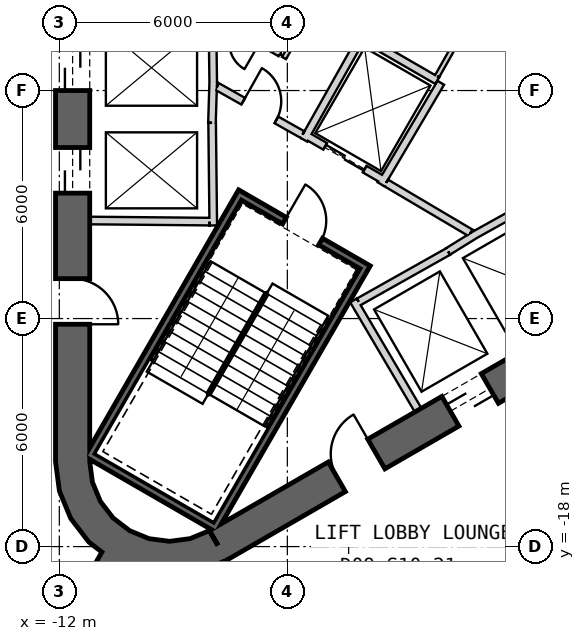
"""IFC4 building model, lengths in metres.
Left out: names, types, materials, properties, quantities, classifications, styles, units other than length and angle.
Written with IfcOpenShell. Run it as: python <this file> out.ifc"""

import sys

from ifc_helpers import new_model, si_unit, direction, frame, frame_2d, origin, place, context, subcontext, project, spatial, polyline, rectangle, outline, extrude, element, fill, save


model = new_model("IFC4")
c1 = context("Model", 3, precision=1e-05, world=origin(), true_north=direction((0.0, 1.0)))
c2 = subcontext(c1, "Body", "Model", "MODEL_VIEW")
j1 = project(units=[si_unit("LENGTHUNIT", "METRE"), si_unit("PLANEANGLEUNIT", "RADIAN")], contexts=[c1])
p1 = place(None, origin())
s1 = spatial("IfcSite", under=j1, at=p1, CompositionType="ELEMENT")
p2 = place(p1, origin())
s2 = spatial("IfcBuilding", under=s1, at=p2, CompositionType="ELEMENT")
p3 = place(p2, frame((0.0, 0.0, 181.2)))
s3 = spatial("IfcBuildingStorey", under=s2, at=p3, CompositionType="ELEMENT", Elevation=181.2)
p4 = place(p3, frame((-11.65, 15.762, 0.0), z_axis=(0.0, 0.0, 1.0), x_axis=(0.0, -1.0, 0.0)))
e1 = element("IfcWall", 1, at=p4, inside=s3, PredefinedType="SHEAR", context=c2, shape_type="SweptSolid", body=[
    extrude(rectangle(XDim=31.523, YDim=0.9, at=frame_2d((15.762, 0.0))), origin(), (0.0, 0.0, 1.0), 4.0),
])
p5 = place(p4, frame((7.062, 0.0, 0.0)))
e2 = element("IfcOpeningElement", 2, at=p5, cuts=e1, PredefinedType="OPENING", context=c2, shape_type="SweptSolid", body=[
    extrude(rectangle(XDim=1.2, YDim=2.4, at=frame_2d((0.6, 1.2))), frame((0.0, 0.46, 0.0), z_axis=(0.0, -1.0, 0.0), x_axis=(1.0, 0.0, 0.0)), (0.0, 0.0, 1.0), 0.92),
])
p6 = place(p4, frame((9.762, 0.0, 0.0)))
e3 = element("IfcOpeningElement", 3, at=p6, cuts=e1, PredefinedType="OPENING", context=c2, shape_type="SweptSolid", body=[
    extrude(rectangle(XDim=1.2, YDim=2.4, at=frame_2d((0.6, 1.2))), frame((0.0, 0.46, 0.0), z_axis=(0.0, -1.0, 0.0), x_axis=(1.0, 0.0, 0.0)), (0.0, 0.0, 1.0), 0.92),
])
p7 = place(p4, frame((12.462, 0.0, 0.0)))
e4 = element("IfcOpeningElement", 4, at=p7, cuts=e1, PredefinedType="OPENING", context=c2, shape_type="SweptSolid", body=[
    extrude(rectangle(XDim=1.2, YDim=2.4, at=frame_2d((0.6, 1.2))), frame((0.0, 0.46, 0.0), z_axis=(0.0, -1.0, 0.0), x_axis=(1.0, 0.0, 0.0)), (0.0, 0.0, 1.0), 0.92),
])
p8 = place(p4, frame((15.162, 0.0, 0.0)))
e5 = element("IfcOpeningElement", 5, at=p8, cuts=e1, PredefinedType="OPENING", context=c2, shape_type="SweptSolid", body=[
    extrude(rectangle(XDim=1.2, YDim=2.4, at=frame_2d((0.6, 1.2))), frame((0.0, 0.46, 0.0), z_axis=(0.0, -1.0, 0.0), x_axis=(1.0, 0.0, 0.0)), (0.0, 0.0, 1.0), 0.92),
])
p9 = place(p4, frame((17.862, 0.0, 0.0)))
e6 = element("IfcOpeningElement", 6, at=p9, cuts=e1, PredefinedType="OPENING", context=c2, shape_type="SweptSolid", body=[
    extrude(rectangle(XDim=1.2, YDim=2.4, at=frame_2d((0.6, 1.2))), frame((0.0, 0.46, 0.0), z_axis=(0.0, -1.0, 0.0), x_axis=(1.0, 0.0, 0.0)), (0.0, 0.0, 1.0), 0.92),
])
p10 = place(p4, frame((20.562, 0.0, 0.0)))
e7 = element("IfcOpeningElement", 7, at=p10, cuts=e1, PredefinedType="OPENING", context=c2, shape_type="SweptSolid", body=[
    extrude(rectangle(XDim=1.2, YDim=2.4, at=frame_2d((0.6, 1.2))), frame((0.0, 0.46, 0.0), z_axis=(0.0, -1.0, 0.0), x_axis=(1.0, 0.0, 0.0)), (0.0, 0.0, 1.0), 0.92),
])
p11 = place(p4, frame((23.262, 0.0, 0.0)))
e8 = element("IfcOpeningElement", 8, at=p11, cuts=e1, PredefinedType="OPENING", context=c2, shape_type="SweptSolid", body=[
    extrude(rectangle(XDim=1.2, YDim=2.4, at=frame_2d((0.6, 1.2))), frame((0.0, 0.46, 0.0), z_axis=(0.0, -1.0, 0.0), x_axis=(1.0, 0.0, 0.0)), (0.0, 0.0, 1.0), 0.92),
])
p12 = place(p4, frame((3.612, 0.0, 0.0)))
e9 = element("IfcOpeningElement", 9, at=p12, cuts=e1, PredefinedType="OPENING", context=c2, shape_type="SweptSolid", body=[
    extrude(rectangle(XDim=1.2, YDim=2.4, at=frame_2d((0.6, 1.2))), frame((0.0, 0.46, 0.0), z_axis=(0.0, -1.0, 0.0), x_axis=(1.0, 0.0, 0.0)), (0.0, 0.0, 1.0), 0.92),
])
p13 = place(p4, frame((26.712, 0.0, 0.0)))
e10 = element("IfcOpeningElement", 10, at=p13, cuts=e1, PredefinedType="OPENING", context=c2, shape_type="SweptSolid", body=[
    extrude(rectangle(XDim=1.2, YDim=2.4, at=frame_2d((0.6, 1.2))), frame((0.0, 0.46, 0.0), z_axis=(0.0, -1.0, 0.0), x_axis=(1.0, 0.0, 0.0)), (0.0, 0.0, 1.0), 0.92),
])
p14 = place(p3, frame((-7.825, -17.97, 0.0), z_axis=(0.0, 0.0, 1.0), x_axis=(0.866028369851, 0.499994862586, 0.0)))
e11 = element("IfcWall", 11, at=p14, inside=s3, PredefinedType="SHEAR", context=c2, shape_type="SweptSolid", body=[
    extrude(rectangle(XDim=31.523, YDim=0.9, at=frame_2d((15.762, 0.0))), origin(), (0.0, 0.0, 1.0), 4.0),
])
p15 = place(p14, frame((7.062, 0.0, 0.0)))
e12 = element("IfcOpeningElement", 12, at=p15, cuts=e11, PredefinedType="OPENING", context=c2, shape_type="SweptSolid", body=[
    extrude(rectangle(XDim=1.2, YDim=2.4, at=frame_2d((0.6, 1.2))), frame((0.0, 0.46, 0.0), z_axis=(0.0, -1.0, 0.0), x_axis=(1.0, 0.0, 0.0)), (0.0, 0.0, 1.0), 0.92),
])
p16 = place(p14, frame((9.762, 0.0, 0.0)))
e13 = element("IfcOpeningElement", 13, at=p16, cuts=e11, PredefinedType="OPENING", context=c2, shape_type="SweptSolid", body=[
    extrude(rectangle(XDim=1.2, YDim=2.4, at=frame_2d((0.6, 1.2))), frame((0.0, 0.46, 0.0), z_axis=(0.0, -1.0, 0.0), x_axis=(1.0, 0.0, 0.0)), (0.0, 0.0, 1.0), 0.92),
])
p17 = place(p14, frame((12.462, 0.0, 0.0)))
e14 = element("IfcOpeningElement", 14, at=p17, cuts=e11, PredefinedType="OPENING", context=c2, shape_type="SweptSolid", body=[
    extrude(rectangle(XDim=1.2, YDim=2.4, at=frame_2d((0.6, 1.2))), frame((0.0, 0.46, 0.0), z_axis=(0.0, -1.0, 0.0), x_axis=(1.0, 0.0, 0.0)), (0.0, 0.0, 1.0), 0.92),
])
p18 = place(p14, frame((15.162, 0.0, 0.0)))
e15 = element("IfcOpeningElement", 15, at=p18, cuts=e11, PredefinedType="OPENING", context=c2, shape_type="SweptSolid", body=[
    extrude(rectangle(XDim=1.2, YDim=2.4, at=frame_2d((0.6, 1.2))), frame((0.0, 0.46, 0.0), z_axis=(0.0, -1.0, 0.0), x_axis=(1.0, 0.0, 0.0)), (0.0, 0.0, 1.0), 0.92),
])
p19 = place(p14, frame((17.862, 0.0, 0.0)))
e16 = element("IfcOpeningElement", 16, at=p19, cuts=e11, PredefinedType="OPENING", context=c2, shape_type="SweptSolid", body=[
    extrude(rectangle(XDim=1.2, YDim=2.4, at=frame_2d((0.6, 1.2))), frame((0.0, 0.46, 0.0), z_axis=(0.0, -1.0, 0.0), x_axis=(1.0, 0.0, 0.0)), (0.0, 0.0, 1.0), 0.92),
])
p20 = place(p14, frame((20.562, 0.0, 0.0)))
e17 = element("IfcOpeningElement", 17, at=p20, cuts=e11, PredefinedType="OPENING", context=c2, shape_type="SweptSolid", body=[
    extrude(rectangle(XDim=1.2, YDim=2.4, at=frame_2d((0.6, 1.2))), frame((0.0, 0.46, 0.0), z_axis=(0.0, -1.0, 0.0), x_axis=(1.0, 0.0, 0.0)), (0.0, 0.0, 1.0), 0.92),
])
p21 = place(p14, frame((26.712, 0.0, 0.0)))
e18 = element("IfcOpeningElement", 18, at=p21, cuts=e11, PredefinedType="OPENING", context=c2, shape_type="SweptSolid", body=[
    extrude(rectangle(XDim=1.2, YDim=2.4, at=frame_2d((0.6, 1.2))), frame((0.0, 0.46, 0.0), z_axis=(0.0, -1.0, 0.0), x_axis=(1.0, 0.0, 0.0)), (0.0, 0.0, 1.0), 0.92),
])
p22 = place(p14, frame((3.612, 0.0, 0.0)))
e19 = element("IfcOpeningElement", 19, at=p22, cuts=e11, PredefinedType="OPENING", context=c2, shape_type="SweptSolid", body=[
    extrude(rectangle(XDim=1.2, YDim=2.4, at=frame_2d((0.6, 1.2))), frame((0.0, 0.46, 0.0), z_axis=(0.0, -1.0, 0.0), x_axis=(1.0, 0.0, 0.0)), (0.0, 0.0, 1.0), 0.92),
])
p23 = place(p3, origin())
e20 = element("IfcWall", 20, at=p23, inside=s3, PredefinedType="SHEAR", context=c2, shape_type="SweptSolid", body=[
    extrude(outline(polyline([(-12.1, -15.762), (-11.998, -16.538), (-11.698, -17.262), (-11.221, -17.883), (-10.6, -18.36), (-9.876, -18.659), (-9.1, -18.762), (-8.323, -18.659), (-7.6, -18.36), (-8.05, -17.58), (-8.556, -17.79), (-9.1, -17.862), (-9.644, -17.79), (-10.15, -17.58), (-10.585, -17.247), (-10.919, -16.812), (-11.128, -16.305), (-11.2, -15.762), (-12.1, -15.762)])), origin(), (0.0, 0.0, 1.0), 4.0),
])
p24 = place(p3, frame((-10.575, -18.316, 0.0), z_axis=(0.0, 0.0, 1.0), x_axis=(-0.500002625756, -0.866023887798, 0.0)))
e21 = element("IfcWall", 21, at=p24, inside=s3, PredefinedType="SHEAR", context=c2, shape_type="SweptSolid", body=[
    extrude(rectangle(XDim=12.22, YDim=0.7, at=frame_2d((6.11, 0.0))), origin(), (0.0, 0.0, 1.0), 4.0),
])
p25 = place(p3, frame((-7.95, -5.772, 0.0), z_axis=(0.0, 0.0, 1.0), x_axis=(-0.030803413295, -0.999525462272, 0.0)))
e22 = element("IfcWall", 22, at=p25, inside=s3, PredefinedType="PLUMBINGWALL", context=c2, shape_type="SweptSolid", body=[
    extrude(rectangle(XDim=1.078, YDim=0.2, at=frame_2d((0.539, 0.0))), origin(), (0.0, 0.0, 1.0), 3.7),
])
p26 = place(p3, frame((-7.971, -4.05, 0.0), z_axis=(0.0, 0.0, 1.0), x_axis=(0.012042535896, -0.999927486035, 0.0)))
e23 = element("IfcWall", 23, at=p26, inside=s3, PredefinedType="PLUMBINGWALL", context=c2, shape_type="SweptSolid", body=[
    extrude(rectangle(XDim=1.845, YDim=0.2, at=frame_2d((0.922, 0.0))), origin(), (0.0, 0.0, 1.0), 3.7),
])
p27 = place(p3, frame((-7.979, -6.85, 0.0), z_axis=(0.0, 0.0, 1.0), x_axis=(0.011121475088, -0.999938154483, 0.0)))
e24 = element("IfcWall", 24, at=p27, inside=s3, PredefinedType="PLUMBINGWALL", context=c2, shape_type="SweptSolid", body=[
    extrude(rectangle(XDim=2.7, YDim=0.2, at=frame_2d((1.35, 0.0))), origin(), (0.0, 0.0, 1.0), 3.7),
])
p28 = place(p3, frame((-8.05, -9.449, 0.0), z_axis=(0.0, 0.0, 1.0), x_axis=(-0.999957467379, 0.009222983926, 0.0)))
e25 = element("IfcWall", 25, at=p28, inside=s3, PredefinedType="PLUMBINGWALL", context=c2, shape_type="SweptSolid", body=[
    extrude(rectangle(XDim=3.15, YDim=0.2, at=frame_2d((1.575, 0.0))), origin(), (0.0, 0.0, 1.0), 3.7),
])
p29 = place(p3, frame((-2.558, -14.409, 0.0), z_axis=(0.0, 0.0, 1.0), x_axis=(-0.507997497166, 0.861358544901, 0.0)))
e26 = element("IfcWall", 26, at=p29, inside=s3, PredefinedType="PLUMBINGWALL", context=c2, shape_type="SweptSolid", body=[
    extrude(rectangle(XDim=3.35, YDim=0.2, at=frame_2d((1.675, 0.0))), origin(), (0.0, 0.0, 1.0), 3.7),
])
p30 = place(p3, frame((-1.769, -10.237, 0.0), z_axis=(0.0, 0.0, 1.0), x_axis=(-0.871534483978, -0.490334215854, 0.0)))
e27 = element("IfcWall", 27, at=p30, inside=s3, PredefinedType="PLUMBINGWALL", context=c2, shape_type="SweptSolid", body=[
    extrude(rectangle(XDim=2.7, YDim=0.2, at=frame_2d((1.35, 0.0))), origin(), (0.0, 0.0, 1.0), 3.7),
])
p31 = place(p3, frame((-1.024, -9.771, 0.0), z_axis=(0.0, 0.0, 1.0), x_axis=(-0.850348075135, -0.526220629693, 0.0)))
e28 = element("IfcWall", 28, at=p31, inside=s3, PredefinedType="PLUMBINGWALL", context=c2, shape_type="SweptSolid", body=[
    extrude(rectangle(XDim=0.878, YDim=0.2, at=frame_2d((0.439, 0.0))), origin(), (0.0, 0.0, 1.0), 3.7),
])
p32 = place(p3, frame((-1.13, -9.831, 0.0), z_axis=(0.0, 0.0, 1.0), x_axis=(0.874269620932, 0.485440655401, 0.0)))
e29 = element("IfcWall", 29, at=p32, inside=s3, PredefinedType="PLUMBINGWALL", context=c2, shape_type="SweptSolid", body=[
    extrude(rectangle(XDim=1.845, YDim=0.2, at=frame_2d((0.922, 0.0))), origin(), (0.0, 0.0, 1.0), 3.7),
])
p33 = place(p3, frame((-3.905, -10.563, -0.3), z_axis=(0.0, 0.0, 1.0), x_axis=(-0.500012932018, -0.866017937352, 0.0)))
e30 = element("IfcWall", 30, at=p33, inside=s3, PredefinedType="SHEAR", context=c2, shape_type="SweptSolid", body=[
    extrude(rectangle(XDim=8.1, YDim=0.2, at=frame_2d((4.05, 0.0))), origin(), (0.0, 0.0, 1.0), 4.0),
])
p34 = place(p3, frame((-11.282, -15.541, -0.3), z_axis=(0.0, 0.0, 1.0), x_axis=(0.866000483506, -0.500043160704, 0.0)))
e31 = element("IfcWall", 31, at=p34, inside=s3, PredefinedType="SHEAR", context=c2, shape_type="SweptSolid", body=[
    extrude(rectangle(XDim=3.8, YDim=0.2, at=frame_2d((1.9, 0.0))), origin(), (0.0, 0.0, 1.0), 4.0),
])
p35 = place(p3, frame((-7.196, -8.663, -0.3), z_axis=(0.0, 0.0, 1.0), x_axis=(-0.499997992926, -0.866026562566, 0.0)))
e32 = element("IfcWall", 32, at=p35, inside=s3, PredefinedType="SHEAR", context=c2, shape_type="SweptSolid", body=[
    extrude(rectangle(XDim=7.9, YDim=0.2, at=frame_2d((3.95, 0.0))), origin(), (0.0, 0.0, 1.0), 4.0),
])
p36 = place(p3, frame((-4.041, -10.599, -0.3), z_axis=(0.0, 0.0, 1.0), x_axis=(-0.866047807691, 0.499961193289, 0.0)))
e33 = element("IfcWall", 33, at=p36, inside=s3, PredefinedType="SHEAR", context=c2, shape_type="SweptSolid", body=[
    extrude(rectangle(XDim=3.6, YDim=0.2, at=frame_2d((1.8, 0.0))), origin(), (0.0, 0.0, 1.0), 4.0),
])
p37 = place(p36, frame((1.25, 0.0, 0.3)))
e34 = element("IfcOpeningElement", 34, at=p37, cuts=e33, PredefinedType="OPENING", context=c2, shape_type="SweptSolid", body=[
    extrude(rectangle(XDim=1.1, YDim=2.1, at=frame_2d((0.55, 1.05))), frame((0.0, 0.11, 0.0), z_axis=(0.0, -1.0, 0.0), x_axis=(1.0, 0.0, 0.0)), (0.0, 0.0, 1.0), 0.22),
])
p38 = place(p3, frame((-3.446, -8.368, 0.0), z_axis=(0.0, 0.0, 1.0), x_axis=(-0.866024647952, 0.500001309137, 0.0)))
e35 = element("IfcWall", 35, at=p38, inside=s3, PredefinedType="PLUMBINGWALL", context=c2, shape_type="SweptSolid", body=[
    extrude(rectangle(XDim=2.4, YDim=0.2, at=frame_2d((1.2, 0.0))), origin(), (0.0, 0.0, 1.0), 3.7),
])
p39 = place(p38, frame((0.6, 0.0, 0.0)))
e36 = element("IfcOpeningElement", 36, at=p39, cuts=e35, PredefinedType="OPENING", context=c2, shape_type="SweptSolid", body=[
    extrude(rectangle(XDim=1.2, YDim=2.4, at=frame_2d((0.6, 1.2))), frame((0.0, 0.11, 0.0), z_axis=(0.0, -1.0, 0.0), x_axis=(1.0, 0.0, 0.0)), (0.0, 0.0, 1.0), 0.22),
])
p40 = place(p3, frame((-1.961, -5.796, 0.0), z_axis=(0.0, 0.0, 1.0), x_axis=(-0.508647062354, -0.860975125052, 0.0)))
e37 = element("IfcWall", 37, at=p40, inside=s3, PredefinedType="PLUMBINGWALL", context=c2, shape_type="SweptSolid", body=[
    extrude(rectangle(XDim=3.1, YDim=0.2, at=frame_2d((1.55, 0.0))), origin(), (0.0, 0.0, 1.0), 3.7),
])
p41 = place(p3, frame((-3.99, -4.509, 0.0), z_axis=(0.0, 0.0, 1.0), x_axis=(-0.491358283181, -0.870957540612, 0.0)))
e38 = element("IfcWall", 38, at=p41, inside=s3, PredefinedType="PLUMBINGWALL", context=c2, shape_type="SweptSolid", body=[
    extrude(rectangle(XDim=3.2, YDim=0.2, at=frame_2d((1.6, 0.0))), origin(), (0.0, 0.0, 1.0), 3.7),
])
p42 = place(p3, frame((-3.953, -4.646, 0.0), z_axis=(0.0, 0.0, 1.0), x_axis=(0.866038900241, -0.499976622722, 0.0)))
e39 = element("IfcWall", 39, at=p42, inside=s3, PredefinedType="PLUMBINGWALL", context=c2, shape_type="SweptSolid", body=[
    extrude(rectangle(XDim=2.189, YDim=0.2, at=frame_2d((1.095, 0.0))), origin(), (0.0, 0.0, 1.0), 3.7),
])
p43 = place(p3, frame((-3.401, -8.43, 0.0), z_axis=(0.0, 0.0, 1.0), x_axis=(0.860615607571, -0.509255118781, 0.0)))
e40 = element("IfcWall", 40, at=p43, inside=s3, PredefinedType="PARTITIONING", context=c2, shape_type="SweptSolid", body=[
    extrude(rectangle(XDim=2.581, YDim=0.2, at=frame_2d((1.29, 0.0))), origin(), (0.0, 0.0, 1.0), 3.7),
])
p44 = place(p3, frame((-7.849, -5.894, 0.0), z_axis=(0.0, 0.0, 1.0), x_axis=(0.871363259478, -0.490638431059, 0.0)))
e41 = element("IfcWall", 41, at=p44, inside=s3, PredefinedType="PARTITIONING", context=c2, shape_type="SweptSolid", body=[
    extrude(rectangle(XDim=2.581, YDim=0.2, at=frame_2d((1.291, 0.0))), origin(), (0.0, 0.0, 1.0), 3.7),
])
p45 = place(p44, frame((0.791, 0.0, 0.0)))
e42 = element("IfcOpeningElement", 42, at=p45, cuts=e41, PredefinedType="OPENING", context=c2, shape_type="SweptSolid", body=[
    extrude(rectangle(XDim=1.0, YDim=2.1, at=frame_2d((0.5, 1.05))), frame((0.0, 0.11, 0.0), z_axis=(0.0, -1.0, 0.0), x_axis=(1.0, 0.0, 0.0)), (0.0, 0.0, 1.0), 0.22),
])
p46 = place(p3, frame((-0.34, -2.586, 0.0), z_axis=(0.0, 0.0, 1.0), x_axis=(-0.492647196214, -0.870229130782, 0.0)))
e43 = element("IfcWall", 43, at=p46, inside=s3, PredefinedType="PARTITIONING", context=c2, shape_type="SweptSolid", body=[
    extrude(rectangle(XDim=3.49, YDim=0.12, at=frame_2d((1.745, 0.0))), origin(), (0.0, 0.0, 1.0), 3.7),
])
p47 = place(p46, frame((1.396, 0.0, 0.0)))
e44 = element("IfcOpeningElement", 44, at=p47, cuts=e43, PredefinedType="OPENING", context=c2, shape_type="SweptSolid", body=[
    extrude(rectangle(XDim=0.8, YDim=2.1, at=frame_2d((0.4, 1.05))), frame((0.0, 0.07, 0.0), z_axis=(0.0, -1.0, 0.0), x_axis=(1.0, 0.0, 0.0)), (0.0, 0.0, 1.0), 0.14),
])
p48 = place(p3, frame((-6.231, 5.062, 0.0), z_axis=(0.0, 0.0, 1.0), x_axis=(0.0, -1.0, 0.0)))
e45 = element("IfcWall", 45, at=p48, inside=s3, PredefinedType="PARTITIONING", context=c2, shape_type="SweptSolid", body=[
    extrude(rectangle(XDim=10.125, YDim=0.12, at=frame_2d((5.062, 0.0))), origin(), (0.0, 0.0, 1.0), 3.7),
])
p49 = place(p3, frame((-7.95, -4.041, 0.0), z_axis=(0.0, 0.0, 1.0), x_axis=(0.867071050325, -0.498184497639, 0.0)))
e46 = element("IfcWall", 46, at=p49, inside=s3, PredefinedType="PARTITIONING", context=c2, shape_type="SweptSolid", body=[
    extrude(rectangle(XDim=2.017, YDim=0.12, at=frame_2d((1.008, 0.0))), origin(), (0.0, 0.0, 1.0), 3.7),
])
p50 = place(p49, frame((0.608, 0.0, 0.0)))
e47 = element("IfcOpeningElement", 47, at=p50, cuts=e46, PredefinedType="OPENING", context=c2, shape_type="SweptSolid", body=[
    extrude(rectangle(XDim=0.8, YDim=2.1, at=frame_2d((0.4, 1.05))), frame((0.0, 0.07, 0.0), z_axis=(0.0, -1.0, 0.0), x_axis=(1.0, 0.0, 0.0)), (0.0, 0.0, 1.0), 0.14),
])
p51 = place(p3, frame((-6.088, -5.145, 0.0), z_axis=(0.0, 0.0, 1.0), x_axis=(0.500050696077, 0.865996132412, 0.0)))
e48 = element("IfcWall", 48, at=p51, inside=s3, PredefinedType="PARTITIONING", context=c2, shape_type="SweptSolid", body=[
    extrude(rectangle(XDim=2.94, YDim=0.12, at=frame_2d((1.47, 0.0))), origin(), (0.0, 0.0, 1.0), 3.7),
])
p52 = place(p3, frame((-0.223, -19.874, 0.0), z_axis=(0.0, 0.0, 1.0), x_axis=(0.866025366729, 0.500000064182, 0.0)))
e49 = element("IfcWall", 49, at=p52, inside=s3, PredefinedType="PARTITIONING", context=c2, shape_type="SweptSolid", body=[
    extrude(rectangle(XDim=12.18, YDim=0.2, at=frame_2d((6.09, 0.0))), origin(), (0.0, 0.0, 1.0), 2.98),
])
p53 = place(p37, origin())
e50 = element("IfcDoor", 50, at=p53, inside=s3, OperationType="SINGLE_SWING_LEFT", PredefinedType="USERDEFINED", context=c2, shape_type="SweptSolid", body=[
    extrude(rectangle(XDim=1.1, YDim=2.1, at=frame_2d((0.55, 1.05))), frame((0.0, 0.025, 0.0), z_axis=(0.0, -1.0, 0.0), x_axis=(1.0, 0.0, 0.0)), (0.0, 0.0, 1.0), 0.05),
])
fill(e34, e50)
p54 = place(p45, origin())
e51 = element("IfcDoor", 51, at=p54, inside=s3, OperationType="SINGLE_SWING_RIGHT", PredefinedType="USERDEFINED", context=c2, shape_type="SweptSolid", body=[
    extrude(rectangle(XDim=1.0, YDim=2.1, at=frame_2d((0.5, 1.05))), frame((0.0, 0.025, 0.0), z_axis=(0.0, -1.0, 0.0), x_axis=(1.0, 0.0, 0.0)), (0.0, 0.0, 1.0), 0.05),
])
fill(e42, e51)
p55 = place(p39, origin())
e52 = element("IfcDoor", 52, at=p55, inside=s3, OperationType="SLIDING_TO_LEFT", PredefinedType="USERDEFINED", context=c2, shape_type="SweptSolid", body=[
    extrude(rectangle(XDim=1.2, YDim=2.4, at=frame_2d((0.6, 1.2))), frame((0.0, 0.025, 0.0), z_axis=(0.0, -1.0, 0.0), x_axis=(1.0, 0.0, 0.0)), (0.0, 0.0, 1.0), 0.05),
])
fill(e36, e52)
p56 = place(p10, origin())
e53 = element("IfcDoor", 53, at=p56, inside=s3, OperationType="SLIDING_TO_LEFT", PredefinedType="USERDEFINED", context=c2, shape_type="SweptSolid", body=[
    extrude(rectangle(XDim=1.2, YDim=2.4, at=frame_2d((0.6, 1.2))), frame((0.0, 0.025, 0.0), z_axis=(0.0, -1.0, 0.0), x_axis=(1.0, 0.0, 0.0)), (0.0, 0.0, 1.0), 0.05),
])
fill(e7, e53)
p57 = place(p11, origin())
e54 = element("IfcDoor", 54, at=p57, inside=s3, OperationType="SLIDING_TO_LEFT", PredefinedType="USERDEFINED", context=c2, shape_type="SweptSolid", body=[
    extrude(rectangle(XDim=1.2, YDim=2.4, at=frame_2d((0.6, 1.2))), frame((0.0, 0.025, 0.0), z_axis=(0.0, -1.0, 0.0), x_axis=(1.0, 0.0, 0.0)), (0.0, 0.0, 1.0), 0.05),
])
fill(e8, e54)
p58 = place(p15, origin())
e55 = element("IfcDoor", 55, at=p58, inside=s3, OperationType="SLIDING_TO_LEFT", PredefinedType="USERDEFINED", context=c2, shape_type="SweptSolid", body=[
    extrude(rectangle(XDim=1.2, YDim=2.4, at=frame_2d((0.6, 1.2))), frame((0.0, 0.025, 0.0), z_axis=(0.0, -1.0, 0.0), x_axis=(1.0, 0.0, 0.0)), (0.0, 0.0, 1.0), 0.05),
])
fill(e12, e55)
p59 = place(p13, origin())
e56 = element("IfcDoor", 56, at=p59, inside=s3, OperationType="SINGLE_SWING_LEFT", PredefinedType="USERDEFINED", context=c2, shape_type="SweptSolid", body=[
    extrude(rectangle(XDim=1.2, YDim=2.4, at=frame_2d((0.6, 1.2))), frame((0.0, 0.025, 0.0), z_axis=(0.0, -1.0, 0.0), x_axis=(1.0, 0.0, 0.0)), (0.0, 0.0, 1.0), 0.05),
])
fill(e10, e56)
p60 = place(p22, origin())
e57 = element("IfcDoor", 57, at=p60, inside=s3, OperationType="SINGLE_SWING_LEFT", PredefinedType="USERDEFINED", context=c2, shape_type="SweptSolid", body=[
    extrude(rectangle(XDim=1.2, YDim=2.4, at=frame_2d((0.6, 1.2))), frame((0.0, 0.025, 0.0), z_axis=(0.0, -1.0, 0.0), x_axis=(1.0, 0.0, 0.0)), (0.0, 0.0, 1.0), 0.05),
])
fill(e19, e57)
save(model, sys.argv[1])
